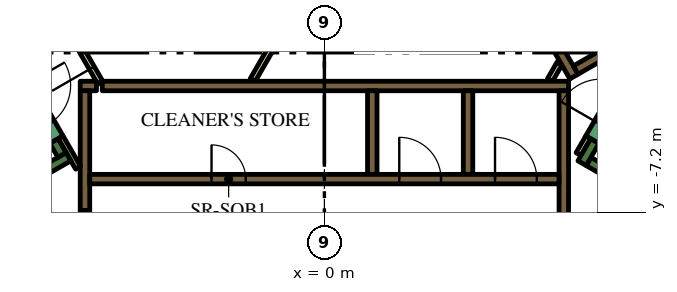
"""IFC4 building model, lengths in metres.
Left out: names, types, materials, properties, quantities, classifications, styles, units other than length and angle.
Written with IfcOpenShell. Run it as: python <this file> out.ifc"""

import sys

from ifc_helpers import new_model, si_unit, direction, frame, frame_2d, origin, place, context, subcontext, project, spatial, polyline, rectangle, outline, extrude, element, fill, save


model = new_model("IFC4")
c1 = context("Model", 3, precision=1e-05, world=origin(), true_north=direction((0.0, 1.0)))
c2 = subcontext(c1, "Body", "Model", "MODEL_VIEW")
j1 = project(units=[si_unit("LENGTHUNIT", "METRE"), si_unit("PLANEANGLEUNIT", "RADIAN")], contexts=[c1])
p1 = place(None, origin())
s1 = spatial("IfcSite", under=j1, at=p1, CompositionType="ELEMENT")
p2 = place(p1, origin())
s2 = spatial("IfcBuilding", under=s1, at=p2, CompositionType="ELEMENT")
p3 = place(p2, frame((0.0, 0.0, 87.6)))
s3 = spatial("IfcBuildingStorey", under=s2, at=p3, CompositionType="ELEMENT", Elevation=87.6)
p4 = place(p3, frame((6.776, 13.364, 0.0), z_axis=(0.0, 0.0, 1.0), x_axis=(0.500004177138, -0.8660229921, 0.0)))
e1 = element("IfcWall", 1, at=p4, inside=s3, PredefinedType="SOLIDWALL", context=c2, shape_type="SweptSolid", body=[
    extrude(rectangle(XDim=20.204, YDim=0.9, at=frame_2d((10.102, 0.0))), origin(), (0.0, 0.0, 1.0), 3.9),
])
p5 = place(p3, frame((12.84, -9.261, 0.0), z_axis=(0.0, 0.0, 1.0), x_axis=(-0.866013990052, 0.500019768644, 0.0)))
e2 = element("IfcWall", 2, at=p5, inside=s3, PredefinedType="SOLIDWALL", context=c2, shape_type="SweptSolid", body=[
    extrude(rectangle(XDim=6.8, YDim=0.25, at=frame_2d((3.4, 0.0))), origin(), (0.0, 0.0, 1.0), 3.9),
])
p6 = place(p3, frame((6.78, -5.906, 0.0), z_axis=(0.0, 0.0, 1.0), x_axis=(0.500223362819, 0.865896406789, 0.0)))
e3 = element("IfcWall", 3, at=p6, inside=s3, PredefinedType="SOLIDWALL", context=c2, shape_type="SweptSolid", body=[
    extrude(rectangle(XDim=0.675, YDim=0.25, at=frame_2d((0.337, 0.0))), origin(), (0.0, 0.0, 1.0), 3.9),
])
p7 = place(p3, frame((-12.84, -9.261, 0.0), z_axis=(0.0, 0.0, 1.0), x_axis=(0.866016039709, 0.500016218704, 0.0)))
e4 = element("IfcWall", 4, at=p7, inside=s3, PredefinedType="SOLIDWALL", context=c2, shape_type="SweptSolid", body=[
    extrude(rectangle(XDim=7.05, YDim=0.25, at=frame_2d((3.525, 0.0))), origin(), (0.0, 0.0, 1.0), 3.9),
])
p8 = place(p3, frame((-6.905, -5.69, 0.0), z_axis=(0.0, 0.0, 1.0), x_axis=(-0.500402024738, 0.865793170242, 0.0)))
e5 = element("IfcWall", 5, at=p8, inside=s3, PredefinedType="SOLIDWALL", context=c2, shape_type="SweptSolid", body=[
    extrude(rectangle(XDim=0.425, YDim=0.25, at=frame_2d((0.212, 0.0))), origin(), (0.0, 0.0, 1.0), 3.9),
])
p9 = place(p3, frame((-5.845, -3.875, 0.0), z_axis=(0.0, 0.0, 1.0), x_axis=(1.0, 0.0, 0.0)))
e6 = element("IfcWall", 6, at=p9, inside=s3, PredefinedType="SOLIDWALL", context=c2, shape_type="SweptSolid", body=[
    extrude(rectangle(XDim=12.27, YDim=0.25, at=frame_2d((6.135, 0.0))), origin(), (0.0, 0.0, 1.0), 3.9),
])
p10 = place(p3, frame((-6.425, -3.875, 0.0), z_axis=(0.0, 0.0, 1.0), x_axis=(1.0, 0.0, 0.0)))
e7 = element("IfcWall", 7, at=p10, inside=s3, PredefinedType="SOLIDWALL", context=c2, shape_type="SweptSolid", body=[
    extrude(rectangle(XDim=0.428, YDim=0.25, at=frame_2d((0.214, 0.0))), origin(), (0.0, 0.0, 1.0), 3.9),
])
p11 = place(p3, frame((6.3, -7.268, 0.0), z_axis=(0.0, 0.0, 1.0), x_axis=(0.0, 1.0, 0.0)))
e8 = element("IfcWall", 8, at=p11, inside=s3, PredefinedType="SOLIDWALL", context=c2, shape_type="SweptSolid", body=[
    extrude(rectangle(XDim=3.268, YDim=0.25, at=frame_2d((1.634, 0.0))), origin(), (0.0, 0.0, 1.0), 3.9),
])
for number, where, z_axis, x_axis in (
    (9, (3.78, -4.0, 0.0), (0.0, 0.0, 1.0), (0.0, -1.0, 0.0)),
    (10, (1.26, -4.0, 0.0), (0.0, 0.0, 1.0), (0.0, -1.0, 0.0)),
):
    element("IfcWall", number, at=place(p3, frame(where, z_axis=z_axis, x_axis=x_axis)), inside=s3, PredefinedType="SOLIDWALL", context=c2, shape_type="SweptSolid", body=[
        extrude(rectangle(XDim=2.2, YDim=0.25, at=frame_2d((1.1, 0.0))), origin(), (0.0, 0.0, 1.0), 3.9),
    ])
p12 = place(p3, frame((-6.3, -4.0, 0.0), z_axis=(0.0, 0.0, 1.0), x_axis=(0.0, -1.0, 0.0)))
e11 = element("IfcWall", 11, at=p12, inside=s3, PredefinedType="SOLIDWALL", context=c2, shape_type="SweptSolid", body=[
    extrude(rectangle(XDim=3.154, YDim=0.25, at=frame_2d((1.577, 0.0))), origin(), (0.0, 0.0, 1.0), 3.9),
])
p13 = place(p3, origin())
e12 = element("IfcWall", 12, at=p13, inside=s3, PredefinedType="SOLIDWALL", context=c2, shape_type="SweptSolid", body=[
    extrude(outline(polyline([(0.335, 6.925), (0.335, 7.075), (0.335, 7.075), (0.335, 7.075), (0.245, 7.075), (0.079, 7.363), (0.035, 7.439), (0.252, 7.564), (0.377, 7.348), (6.552, -3.348), (6.677, -3.564), (6.46, -3.689), (4.897, -0.981), (0.332, 6.925), (0.335, 6.925), (0.335, 6.925), (0.335, 6.925)])), origin(), (0.0, 0.0, 1.0), 3.9),
])
p14 = place(p3, frame((6.614, -3.456, 0.0), z_axis=(0.0, 0.0, 1.0), x_axis=(0.86602447079, 0.500001615989, 0.0)))
e13 = element("IfcWall", 13, at=p14, inside=s3, PredefinedType="SOLIDWALL", context=c2, shape_type="SweptSolid", body=[
    extrude(rectangle(XDim=3.154, YDim=0.25, at=frame_2d((1.577, 0.0))), origin(), (0.0, 0.0, 1.0), 3.9),
])
p15 = place(p3, frame((-6.48, -6.027, 0.0), z_axis=(0.0, 0.0, 1.0), x_axis=(-0.499927229454, 0.866067413802, 0.0)))
e14 = element("IfcWall", 14, at=p15, inside=s3, PredefinedType="PARTITIONING", context=c2, shape_type="SweptSolid", body=[
    extrude(rectangle(XDim=0.929, YDim=0.15, at=frame_2d((0.464, 0.0))), origin(), (0.0, 0.0, 1.0), 3.9),
])
p16 = place(p3, frame((6.945, -5.222, 0.0), z_axis=(0.0, 0.0, 1.0), x_axis=(-0.499818422106, -0.866130212453, 0.0)))
e15 = element("IfcWall", 15, at=p16, inside=s3, PredefinedType="PARTITIONING", context=c2, shape_type="SweptSolid", body=[
    extrude(rectangle(XDim=0.514, YDim=0.15, at=frame_2d((0.257, 0.0))), origin(), (0.0, 0.0, 1.0), 2.75),
])
p17 = place(p3, frame((5.936, -3.718, 0.0), z_axis=(0.0, 0.0, 1.0), x_axis=(0.499890179513, 0.866088799389, 0.0)))
e16 = element("IfcWall", 16, at=p17, inside=s3, PredefinedType="PARTITIONING", context=c2, shape_type="SweptSolid", body=[
    extrude(rectangle(XDim=0.504, YDim=0.15, at=frame_2d((0.252, 0.0))), origin(), (0.0, 0.0, 1.0), 2.75),
])
p18 = place(p3, frame((-1.887, -3.718, 0.0), z_axis=(0.0, 0.0, 1.0), x_axis=(0.500033287521, 0.866006184372, 0.0)))
e17 = element("IfcWall", 17, at=p18, inside=s3, PredefinedType="PARTITIONING", context=c2, shape_type="SweptSolid", body=[
    extrude(rectangle(XDim=3.263, YDim=0.15, at=frame_2d((1.632, 0.0))), origin(), (0.0, 0.0, 1.0), 2.75),
])
p19 = place(p3, frame((-6.175, -6.325, 0.0), z_axis=(0.0, 0.0, 1.0), x_axis=(1.0, 0.0, 0.0)))
e18 = element("IfcWall", 18, at=p19, inside=s3, PredefinedType="SOLIDWALL", context=c2, shape_type="SweptSolid", body=[
    extrude(rectangle(XDim=12.35, YDim=0.25, at=frame_2d((6.175, 0.0))), origin(), (0.0, 0.0, 1.0), 3.9),
])
p20 = place(p19, frame((3.205, 0.0, 0.0)))
e19 = element("IfcOpeningElement", 19, at=p20, cuts=e18, PredefinedType="OPENING", context=c2, shape_type="SweptSolid", body=[
    extrude(rectangle(XDim=0.9, YDim=2.1, at=frame_2d((0.45, 1.05))), frame((0.0, 0.135, 0.0), z_axis=(0.0, -1.0, 0.0), x_axis=(1.0, 0.0, 0.0)), (0.0, 0.0, 1.0), 0.27),
])
p21 = place(p19, frame((8.145, 0.0, 0.0)))
e20 = element("IfcOpeningElement", 20, at=p21, cuts=e18, PredefinedType="OPENING", context=c2, shape_type="SweptSolid", body=[
    extrude(rectangle(XDim=1.1, YDim=2.1, at=frame_2d((0.55, 1.05))), frame((0.0, 0.135, 0.0), z_axis=(0.0, -1.0, 0.0), x_axis=(1.0, 0.0, 0.0)), (0.0, 0.0, 1.0), 0.27),
])
p22 = place(p19, frame((10.665, 0.0, 0.0)))
e21 = element("IfcOpeningElement", 21, at=p22, cuts=e18, PredefinedType="OPENING", context=c2, shape_type="SweptSolid", body=[
    extrude(rectangle(XDim=1.1, YDim=2.1, at=frame_2d((0.55, 1.05))), frame((0.0, 0.135, 0.0), z_axis=(0.0, -1.0, 0.0), x_axis=(1.0, 0.0, 0.0)), (0.0, 0.0, 1.0), 0.27),
])
p23 = place(p3, frame((7.053, -5.284, 0.0), z_axis=(0.0, 0.0, 1.0), x_axis=(0.500078061341, 0.865980330357, 0.0)))
e22 = element("IfcWall", 22, at=p23, inside=s3, PredefinedType="SOLIDWALL", context=c2, shape_type="SweptSolid", body=[
    extrude(rectangle(XDim=2.1, YDim=0.4, at=frame_2d((1.05, 0.0))), origin(), (0.0, 0.0, 1.0), 3.9),
])
p24 = place(p23, frame((0.45, 0.0, 0.0)))
e23 = element("IfcOpeningElement", 23, at=p24, cuts=e22, PredefinedType="OPENING", context=c2, shape_type="SweptSolid", body=[
    extrude(rectangle(XDim=1.2, YDim=2.1, at=frame_2d((0.6, 1.05))), frame((0.0, 0.21, 0.0), z_axis=(0.0, -1.0, 0.0), x_axis=(1.0, 0.0, 0.0)), (0.0, 0.0, 1.0), 0.42),
])
p25 = place(p3, frame((-8.103, -3.466, 0.0), z_axis=(0.0, 0.0, 1.0), x_axis=(0.500078061341, -0.865980330357, 0.0)))
e24 = element("IfcWall", 24, at=p25, inside=s3, PredefinedType="SOLIDWALL", context=c2, shape_type="SweptSolid", body=[
    extrude(rectangle(XDim=2.1, YDim=0.4, at=frame_2d((1.05, 0.0))), origin(), (0.0, 0.0, 1.0), 3.9),
])
p26 = place(p25, frame((0.45, 0.0, 0.0)))
e25 = element("IfcOpeningElement", 25, at=p26, cuts=e24, PredefinedType="OPENING", context=c2, shape_type="SweptSolid", body=[
    extrude(rectangle(XDim=1.2, YDim=2.1, at=frame_2d((0.6, 1.05))), frame((0.0, 0.21, 0.0), z_axis=(0.0, -1.0, 0.0), x_axis=(1.0, 0.0, 0.0)), (0.0, 0.0, 1.0), 0.42),
])
p27 = place(p3, frame((-6.3, -7.154, 0.0), z_axis=(0.0, 0.0, 1.0), x_axis=(0.0, -1.0, 0.0)))
e26 = element("IfcWall", 26, at=p27, inside=s3, PredefinedType="SOLIDWALL", context=c2, shape_type="SweptSolid", body=[
    extrude(rectangle(XDim=1.8, YDim=0.25, at=frame_2d((0.9, 0.0))), origin(), (0.0, 0.0, 1.0), 3.9),
])
p28 = place(p27, frame((0.45, 0.0, 0.0)))
e27 = element("IfcOpeningElement", 27, at=p28, cuts=e26, PredefinedType="OPENING", context=c2, shape_type="SweptSolid", body=[
    extrude(rectangle(XDim=0.9, YDim=2.1, at=frame_2d((0.45, 1.05))), frame((0.0, 0.135, 0.0), z_axis=(0.0, -1.0, 0.0), x_axis=(1.0, 0.0, 0.0)), (0.0, 0.0, 1.0), 0.27),
])
p29 = place(p3, frame((-5.895, -3.79, 0.0), z_axis=(0.0, 0.0, 1.0), x_axis=(-0.49994051562, 0.866059744384, 0.0)))
e28 = element("IfcWall", 28, at=p29, inside=s3, PredefinedType="PARTITIONING", context=c2, shape_type="SweptSolid", body=[
    extrude(rectangle(XDim=2.1, YDim=0.15, at=frame_2d((1.05, 0.0))), origin(), (0.0, 0.0, 1.0), 2.75),
])
p30 = place(p29, frame((0.45, 0.0, 0.0)))
e29 = element("IfcOpeningElement", 29, at=p30, cuts=e28, PredefinedType="OPENING", context=c2, shape_type="SweptSolid", body=[
    extrude(rectangle(XDim=1.2, YDim=2.1, at=frame_2d((0.6, 1.05))), frame((0.0, 0.085, 0.0), z_axis=(0.0, -1.0, 0.0), x_axis=(1.0, 0.0, 0.0)), (0.0, 0.0, 1.0), 0.17),
])
p31 = place(p3, frame((6.163, 18.475, 0.0), z_axis=(0.0, 0.0, 1.0), x_axis=(0.500001317485, -0.866024643133, 0.0)))
e30 = element("IfcWall", 30, at=p31, inside=s3, PredefinedType="PARTITIONING", context=c2, shape_type="SweptSolid", body=[
    extrude(rectangle(XDim=25.767, YDim=0.15, at=frame_2d((12.883, 0.0))), origin(), (0.0, 0.0, 1.0), 2.75),
])
p32 = place(p31, frame((24.241, 0.0, 0.0)))
e31 = element("IfcOpeningElement", 31, at=p32, cuts=e30, PredefinedType="OPENING", context=c2, shape_type="SweptSolid", body=[
    extrude(rectangle(XDim=1.0, YDim=2.1, at=frame_2d((0.5, 1.05))), frame((0.0, 0.085, 0.0), z_axis=(0.0, -1.0, 0.0), x_axis=(1.0, 0.0, 0.0)), (0.0, 0.0, 1.0), 0.17),
])
p33 = place(p31, frame((13.144, 0.0, 0.0)))
e32 = element("IfcOpeningElement", 32, at=p33, cuts=e30, PredefinedType="OPENING", context=c2, shape_type="SweptSolid", body=[
    extrude(rectangle(XDim=1.0, YDim=2.1, at=frame_2d((0.5, 1.05))), frame((0.0, 0.085, 0.0), z_axis=(0.0, -1.0, 0.0), x_axis=(1.0, 0.0, 0.0)), (0.0, 0.0, 1.0), 0.17),
])
p34 = place(p31, frame((10.874, 0.0, 0.0)))
e33 = element("IfcOpeningElement", 33, at=p34, cuts=e30, PredefinedType="OPENING", context=c2, shape_type="SweptSolid", body=[
    extrude(rectangle(XDim=0.9, YDim=2.1, at=frame_2d((0.45, 1.05))), frame((0.0, 0.085, 0.0), z_axis=(0.0, -1.0, 0.0), x_axis=(1.0, 0.0, 0.0)), (0.0, 0.0, 1.0), 0.17),
])
p35 = place(p31, frame((3.718, 0.0, 0.0)))
e34 = element("IfcOpeningElement", 34, at=p35, cuts=e30, PredefinedType="OPENING", context=c2, shape_type="SweptSolid", body=[
    extrude(rectangle(XDim=1.1, YDim=2.1, at=frame_2d((0.55, 1.05))), frame((0.0, 0.085, 0.0), z_axis=(0.0, -1.0, 0.0), x_axis=(1.0, 0.0, 0.0)), (0.0, 0.0, 1.0), 0.17),
])
p36 = place(p31, frame((2.411, 0.0, 0.0)))
e35 = element("IfcOpeningElement", 35, at=p36, cuts=e30, PredefinedType="OPENING", context=c2, shape_type="SweptSolid", body=[
    extrude(rectangle(XDim=1.0, YDim=2.1, at=frame_2d((0.5, 1.05))), frame((0.0, 0.085, 0.0), z_axis=(0.0, -1.0, 0.0), x_axis=(1.0, 0.0, 0.0)), (0.0, 0.0, 1.0), 0.17),
])
p37 = place(p3, frame((-19.081, -3.9, 0.0), z_axis=(0.0, 0.0, 1.0), x_axis=(0.499998313975, 0.866026377209, 0.0)))
e36 = element("IfcWall", 36, at=p37, inside=s3, PredefinedType="PARTITIONING", context=c2, shape_type="SweptSolid", body=[
    extrude(rectangle(XDim=25.766, YDim=0.15, at=frame_2d((12.883, 0.0))), origin(), (0.0, 0.0, 1.0), 2.75),
])
p38 = place(p37, frame((19.306, 0.0, 0.0)))
e37 = element("IfcOpeningElement", 37, at=p38, cuts=e36, PredefinedType="OPENING", context=c2, shape_type="SweptSolid", body=[
    extrude(rectangle(XDim=1.0, YDim=2.1, at=frame_2d((0.5, 1.05))), frame((0.0, 0.085, 0.0), z_axis=(0.0, -1.0, 0.0), x_axis=(1.0, 0.0, 0.0)), (0.0, 0.0, 1.0), 0.17),
])
p39 = place(p37, frame((18.0, 0.0, 0.0)))
e38 = element("IfcOpeningElement", 38, at=p39, cuts=e36, PredefinedType="OPENING", context=c2, shape_type="SweptSolid", body=[
    extrude(rectangle(XDim=1.0, YDim=2.1, at=frame_2d((0.5, 1.05))), frame((0.0, 0.085, 0.0), z_axis=(0.0, -1.0, 0.0), x_axis=(1.0, 0.0, 0.0)), (0.0, 0.0, 1.0), 0.17),
])
p40 = place(p37, frame((10.874, 0.0, 0.0)))
e39 = element("IfcOpeningElement", 39, at=p40, cuts=e36, PredefinedType="OPENING", context=c2, shape_type="SweptSolid", body=[
    extrude(rectangle(XDim=0.9, YDim=2.1, at=frame_2d((0.45, 1.05))), frame((0.0, 0.085, 0.0), z_axis=(0.0, -1.0, 0.0), x_axis=(1.0, 0.0, 0.0)), (0.0, 0.0, 1.0), 0.17),
])
p41 = place(p37, frame((8.548, 0.0, 0.0)))
e40 = element("IfcOpeningElement", 40, at=p41, cuts=e36, PredefinedType="OPENING", context=c2, shape_type="SweptSolid", body=[
    extrude(rectangle(XDim=1.1, YDim=2.1, at=frame_2d((0.55, 1.05))), frame((0.0, 0.085, 0.0), z_axis=(0.0, -1.0, 0.0), x_axis=(1.0, 0.0, 0.0)), (0.0, 0.0, 1.0), 0.17),
])
p42 = place(p37, frame((0.18, 0.0, 0.0)))
e41 = element("IfcOpeningElement", 41, at=p42, cuts=e36, PredefinedType="OPENING", context=c2, shape_type="SweptSolid", body=[
    extrude(rectangle(XDim=1.0, YDim=2.1, at=frame_2d((0.5, 1.05))), frame((0.0, 0.085, 0.0), z_axis=(0.0, -1.0, 0.0), x_axis=(1.0, 0.0, 0.0)), (0.0, 0.0, 1.0), 0.17),
])
p43 = place(p20, origin())
e42 = element("IfcDoor", 42, at=p43, inside=s3, OperationType="SINGLE_SWING_LEFT", PredefinedType="DOOR", context=c2, shape_type="SweptSolid", body=[
    extrude(rectangle(XDim=0.9, YDim=2.1, at=frame_2d((0.45, 1.05))), frame((0.0, 0.025, 0.0), z_axis=(0.0, -1.0, 0.0), x_axis=(1.0, 0.0, 0.0)), (0.0, 0.0, 1.0), 0.05),
])
fill(e19, e42)
p44 = place(p21, origin())
e43 = element("IfcDoor", 43, at=p44, inside=s3, OperationType="DOUBLE_DOOR_SLIDING", PredefinedType="DOOR", context=c2, shape_type="SweptSolid", body=[
    extrude(rectangle(XDim=1.1, YDim=2.1, at=frame_2d((0.55, 1.05))), frame((0.0, 0.025, 0.0), z_axis=(0.0, -1.0, 0.0), x_axis=(1.0, 0.0, 0.0)), (0.0, 0.0, 1.0), 0.05),
])
fill(e20, e43)
p45 = place(p22, origin())
e44 = element("IfcDoor", 44, at=p45, inside=s3, OperationType="DOUBLE_DOOR_SLIDING", PredefinedType="DOOR", context=c2, shape_type="SweptSolid", body=[
    extrude(rectangle(XDim=1.1, YDim=2.1, at=frame_2d((0.55, 1.05))), frame((0.0, 0.025, 0.0), z_axis=(0.0, -1.0, 0.0), x_axis=(1.0, 0.0, 0.0)), (0.0, 0.0, 1.0), 0.05),
])
fill(e21, e44)
p46 = place(p30, origin())
e45 = element("IfcDoor", 45, at=p46, inside=s3, OperationType="SINGLE_SWING_LEFT", PredefinedType="DOOR", context=c2, shape_type="SweptSolid", body=[
    extrude(rectangle(XDim=1.2, YDim=2.1, at=frame_2d((0.6, 1.05))), frame((0.0, 0.025, 0.0), z_axis=(0.0, -1.0, 0.0), x_axis=(1.0, 0.0, 0.0)), (0.0, 0.0, 1.0), 0.05),
])
fill(e29, e45)
save(model, sys.argv[1])
